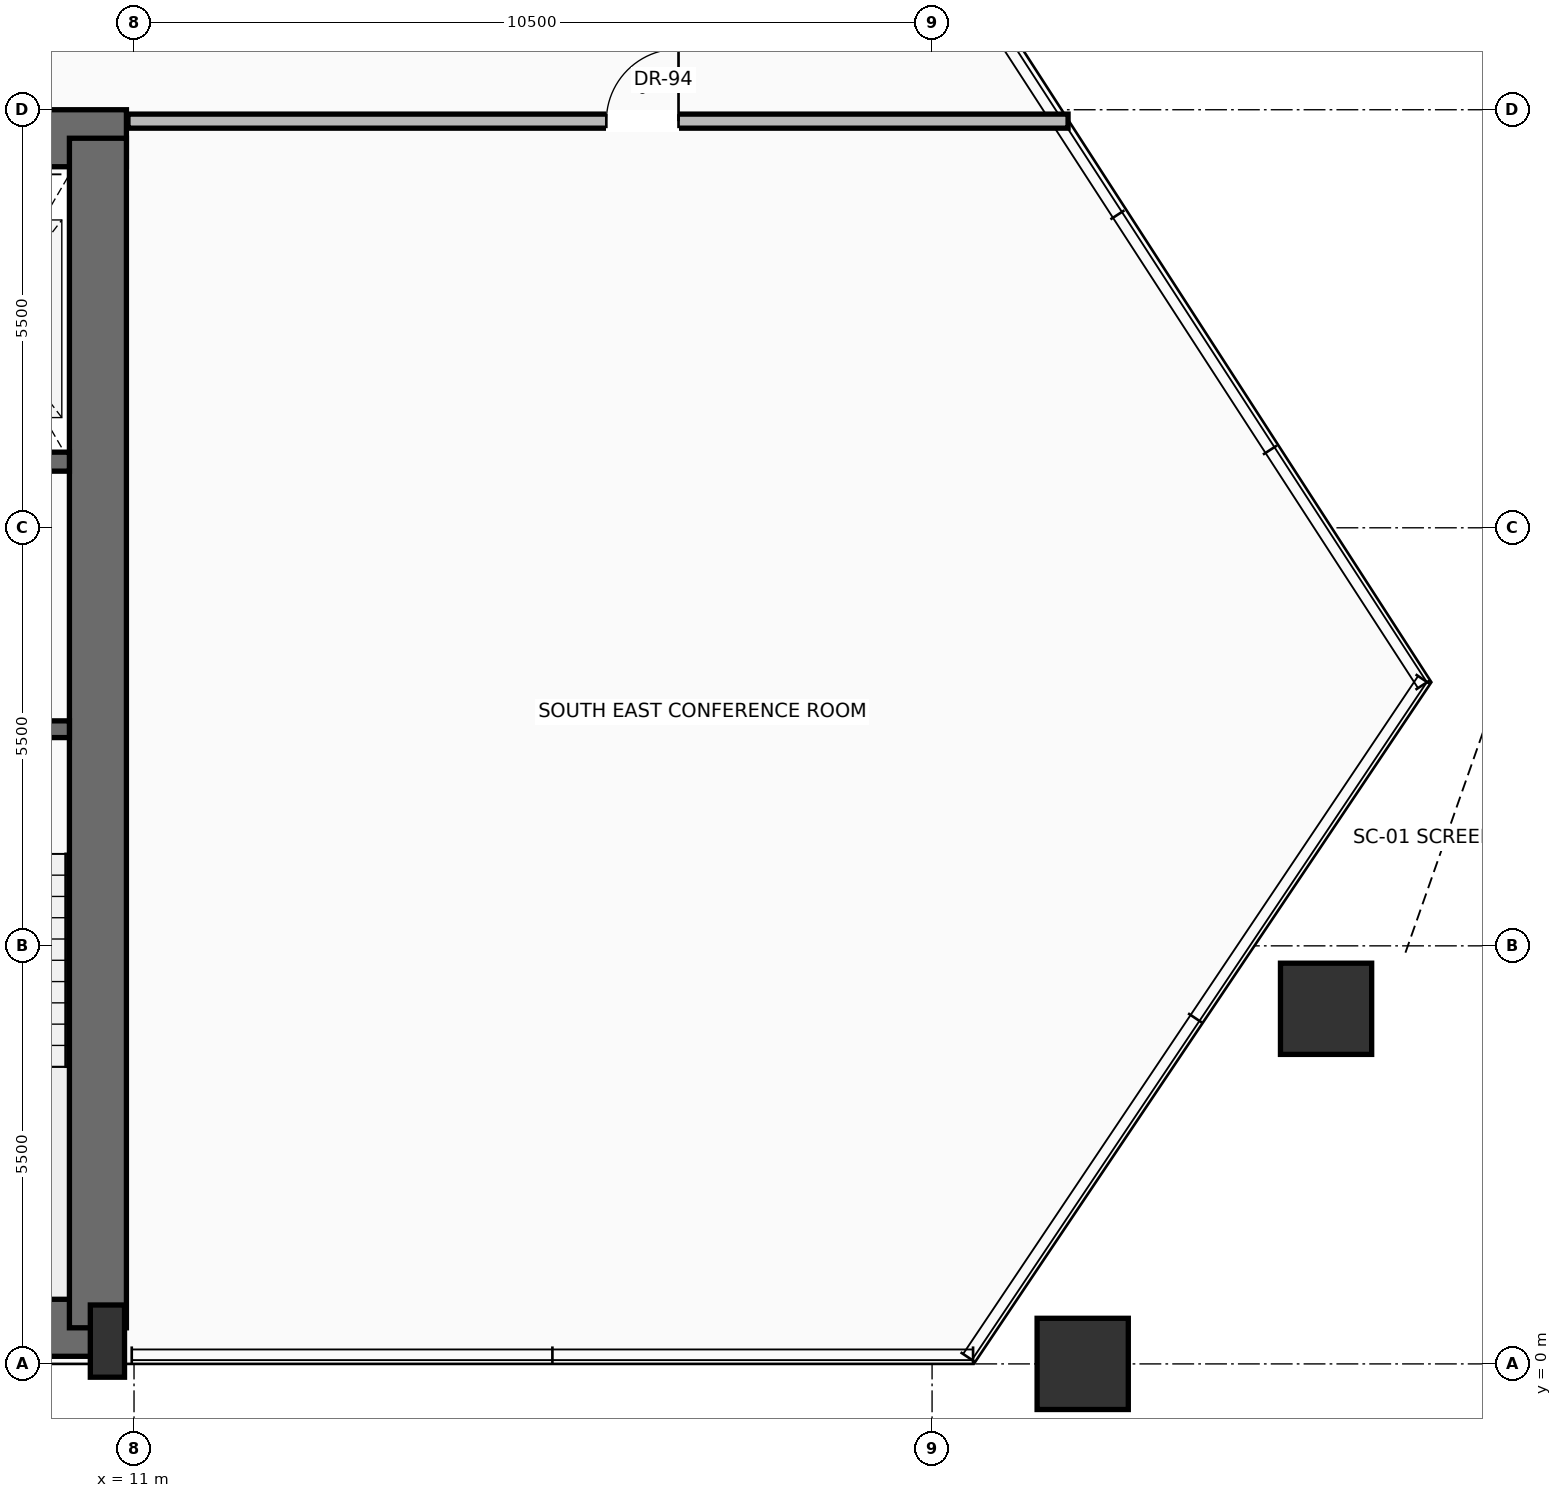
"""IFC4 building model, lengths in metres.
Left out: names, types, materials, properties, quantities, classifications, styles, units other than length and angle.
Written with IfcOpenShell. Run it as: python <this file> out.ifc"""

import sys

from ifc_helpers import new_model, si_unit, direction, frame, frame_2d, origin, origin_2d, place, context, subcontext, project, spatial, rectangle, hollow_rectangle, extrude, source, transform, mapped, element, fill, save


model = new_model("IFC4")
c1 = context("Model", 3, precision=1e-05, world=origin(), true_north=direction((0.0, 1.0)))
c2 = subcontext(c1, "Body", "Model", "MODEL_VIEW")
j1 = project(units=[si_unit("LENGTHUNIT", "METRE"), si_unit("PLANEANGLEUNIT", "RADIAN")], contexts=[c1])
p1 = place(None, origin())
s1 = spatial("IfcSite", under=j1, at=p1, CompositionType="ELEMENT")
p2 = place(p1, origin())
s2 = spatial("IfcBuilding", under=s1, at=p2, CompositionType="ELEMENT")
p3 = place(p2, frame((0.0, 0.0, 98.8)))
s3 = spatial("IfcBuildingStorey", under=s2, at=p3, CompositionType="ELEMENT", Elevation=98.8)
p4 = place(p3, frame((-10.65, 0.475, 0.0), z_axis=(0.0, 0.0, 1.0), x_axis=(1.0, 0.0, 0.0)))
e1 = element("IfcWall", 1, at=p4, inside=s3, PredefinedType="SHEAR", context=c2, shape_type="SweptSolid", body=[
    extrude(rectangle(XDim=21.3, YDim=0.75, at=frame_2d((10.65, 0.0))), origin(), (0.0, 0.0, 1.0), 3.45),
])
p5 = place(p3, frame((-10.9, 16.125, 0.0), z_axis=(0.0, 0.0, 1.0), x_axis=(1.0, 0.0, 0.0)))
e2 = element("IfcWall", 2, at=p5, inside=s3, PredefinedType="SHEAR", context=c2, shape_type="SweptSolid", body=[
    extrude(rectangle(XDim=21.8, YDim=0.75, at=frame_2d((10.9, 0.0))), origin(), (0.0, 0.0, 1.0), 3.45),
])
p6 = place(p5, frame((3.47, 0.0, 0.0)))
e3 = element("IfcOpeningElement", 3, at=p6, cuts=e2, PredefinedType="OPENING", context=c2, shape_type="SweptSolid", body=[
    extrude(rectangle(XDim=1.3, YDim=2.3, at=frame_2d((0.65, 1.15))), frame((0.0, 0.385, 0.0), z_axis=(0.0, -1.0, 0.0), x_axis=(1.0, 0.0, 0.0)), (0.0, 0.0, 1.0), 0.77),
])
p7 = place(p5, frame((9.9, 0.0, 0.0)))
e4 = element("IfcOpeningElement", 4, at=p7, cuts=e2, PredefinedType="OPENING", context=c2, shape_type="SweptSolid", body=[
    extrude(rectangle(XDim=2.0, YDim=2.4, at=frame_2d((1.0, 1.2))), frame((0.0, 0.385, 0.0), z_axis=(0.0, -1.0, 0.0), x_axis=(1.0, 0.0, 0.0)), (0.0, 0.0, 1.0), 0.77),
])
p8 = place(p3, frame((10.525, 0.475, 0.0), z_axis=(0.0, 0.0, 1.0), x_axis=(0.0, 1.0, 0.0)))
e5 = element("IfcWall", 5, at=p8, inside=s3, PredefinedType="SHEAR", context=c2, shape_type="SweptSolid", body=[
    extrude(rectangle(XDim=15.65, YDim=0.75, at=frame_2d((7.825, 0.0))), origin(), (0.0, 0.0, 1.0), 3.45),
])
m1 = source(origin(), c2, "Body", "SweptSolid", [
    extrude(rectangle(XDim=0.45, YDim=0.95, at=origin_2d()), origin(), (0.0, 0.0, 1.0), 3.7),
])
p9 = place(p3, frame((10.65, 0.3, 0.0), z_axis=(0.0, 0.0, 1.0), x_axis=(1.0, 0.0, 0.0)))
e6 = element("IfcColumn", 6, at=p9, inside=s3, PredefinedType="PILASTER", context=c2, shape_type="MappedRepresentation", body=[
    mapped(m1, transform((0.0, 0.0, 0.0), scale=1.0)),
])
m2 = source(origin(), c2, "Body", "SweptSolid", [
    extrude(hollow_rectangle(XDim=1.2, YDim=1.2, WallThickness=0.06, at=origin_2d()), origin(), (0.0, 0.0, 1.0), 3.691),
])
p10 = place(p3, frame((23.482, 0.0, 0.004), z_axis=(0.011838577681, 0.0, 0.999929921584), x_axis=(0.0, 1.0, 0.0)))
e7 = element("IfcColumn", 7, at=p10, inside=s3, PredefinedType="COLUMN", context=c2, shape_type="MappedRepresentation", body=[
    mapped(m2, transform((0.0, 0.0, 0.0), scale=1.0)),
])
m3 = source(origin(), c2, "Body", "SweptSolid", [
    extrude(hollow_rectangle(XDim=1.2, YDim=1.2, WallThickness=0.06, at=origin_2d()), origin(), (0.0, 0.0, 1.0), 3.692),
])
p11 = place(p3, frame((26.684, 4.672, 0.004), z_axis=(-0.000727469504, -0.015872061902, 0.999873766252), x_axis=(0.99895130473, -0.045785268133, 0.0)))
e8 = element("IfcColumn", 8, at=p11, inside=s3, PredefinedType="COLUMN", context=c2, shape_type="MappedRepresentation", body=[
    mapped(m3, transform((0.0, 0.0, 0.0), scale=1.0)),
])
p12 = place(p3, frame((10.15, 8.35, 0.0), z_axis=(0.0, 0.0, 1.0), x_axis=(-1.0, 0.0, 0.0)))
e9 = element("IfcWall", 9, at=p12, inside=s3, PredefinedType="SOLIDWALL", context=c2, shape_type="SweptSolid", body=[
    extrude(rectangle(XDim=4.65, YDim=0.22, at=frame_2d((2.325, 0.0))), origin(), (0.0, 0.0, 1.0), 3.45),
])
p13 = place(p12, frame((1.0, 0.0, 0.0)))
e10 = element("IfcOpeningElement", 10, at=p13, cuts=e9, PredefinedType="OPENING", context=c2, shape_type="SweptSolid", body=[
    extrude(rectangle(XDim=1.15, YDim=2.2, at=frame_2d((0.575, 1.1))), frame((0.0, 0.12, 0.0), z_axis=(0.0, -1.0, 0.0), x_axis=(1.0, 0.0, 0.0)), (0.0, 0.0, 1.0), 0.24),
])
p14 = place(p3, frame((10.15, 11.87, 0.0), z_axis=(0.0, 0.0, 1.0), x_axis=(-1.0, 0.0, 0.0)))
e11 = element("IfcWall", 11, at=p14, inside=s3, PredefinedType="SOLIDWALL", context=c2, shape_type="SweptSolid", body=[
    extrude(rectangle(XDim=4.65, YDim=0.25, at=frame_2d((2.325, 0.0))), origin(), (0.0, 0.0, 1.0), 3.45),
])
p15 = place(p14, frame((0.5, 0.0, 0.0)))
e12 = element("IfcOpeningElement", 12, at=p15, cuts=e11, PredefinedType="OPENING", context=c2, shape_type="SweptSolid", body=[
    extrude(rectangle(XDim=1.2, YDim=2.25, at=frame_2d((0.6, 1.125))), frame((0.0, 0.135, 0.0), z_axis=(0.0, -1.0, 0.0), x_axis=(1.0, 0.0, 0.0)), (0.0, 0.0, 1.0), 0.27),
])
p16 = place(p3, frame((10.92, 16.35, 0.0), z_axis=(0.0, 0.0, 1.0), x_axis=(1.0, 0.0, 0.0)))
e13 = element("IfcWall", 13, at=p16, inside=s3, PredefinedType="PARTITIONING", context=c2, shape_type="SweptSolid", body=[
    extrude(rectangle(XDim=12.369, YDim=0.185, at=frame_2d((6.185, 0.0))), origin(), (0.0, 0.0, 1.0), 2.747),
])
p17 = place(p16, frame((6.294, 0.0, 0.0)))
e14 = element("IfcOpeningElement", 14, at=p17, cuts=e13, PredefinedType="OPENING", context=c2, shape_type="SweptSolid", body=[
    extrude(rectangle(XDim=0.95, YDim=2.2, at=frame_2d((0.475, 1.1))), frame((0.0, 0.103, 0.0), z_axis=(0.0, -1.0, 0.0), x_axis=(1.0, 0.0, 0.0)), (0.0, 0.0, 1.0), 0.205),
])
m4 = source(origin(), c2, "Body", "SweptSolid", [
    extrude(rectangle(XDim=0.95, YDim=2.2, at=frame_2d((0.475, 1.1))), frame((0.0, 0.025, 0.0), z_axis=(0.0, -1.0, 0.0), x_axis=(1.0, 0.0, 0.0)), (0.0, 0.0, 1.0), 0.05),
])
p18 = place(p17, origin())
e15 = element("IfcDoor", 15, at=p18, inside=s3, OperationType="SINGLE_SWING_RIGHT", PredefinedType="DOOR", context=c2, shape_type="MappedRepresentation", body=[
    mapped(m4, transform((0.0, 0.0, 0.0), scale=1.0)),
])
fill(e14, e15)
save(model, sys.argv[1])
